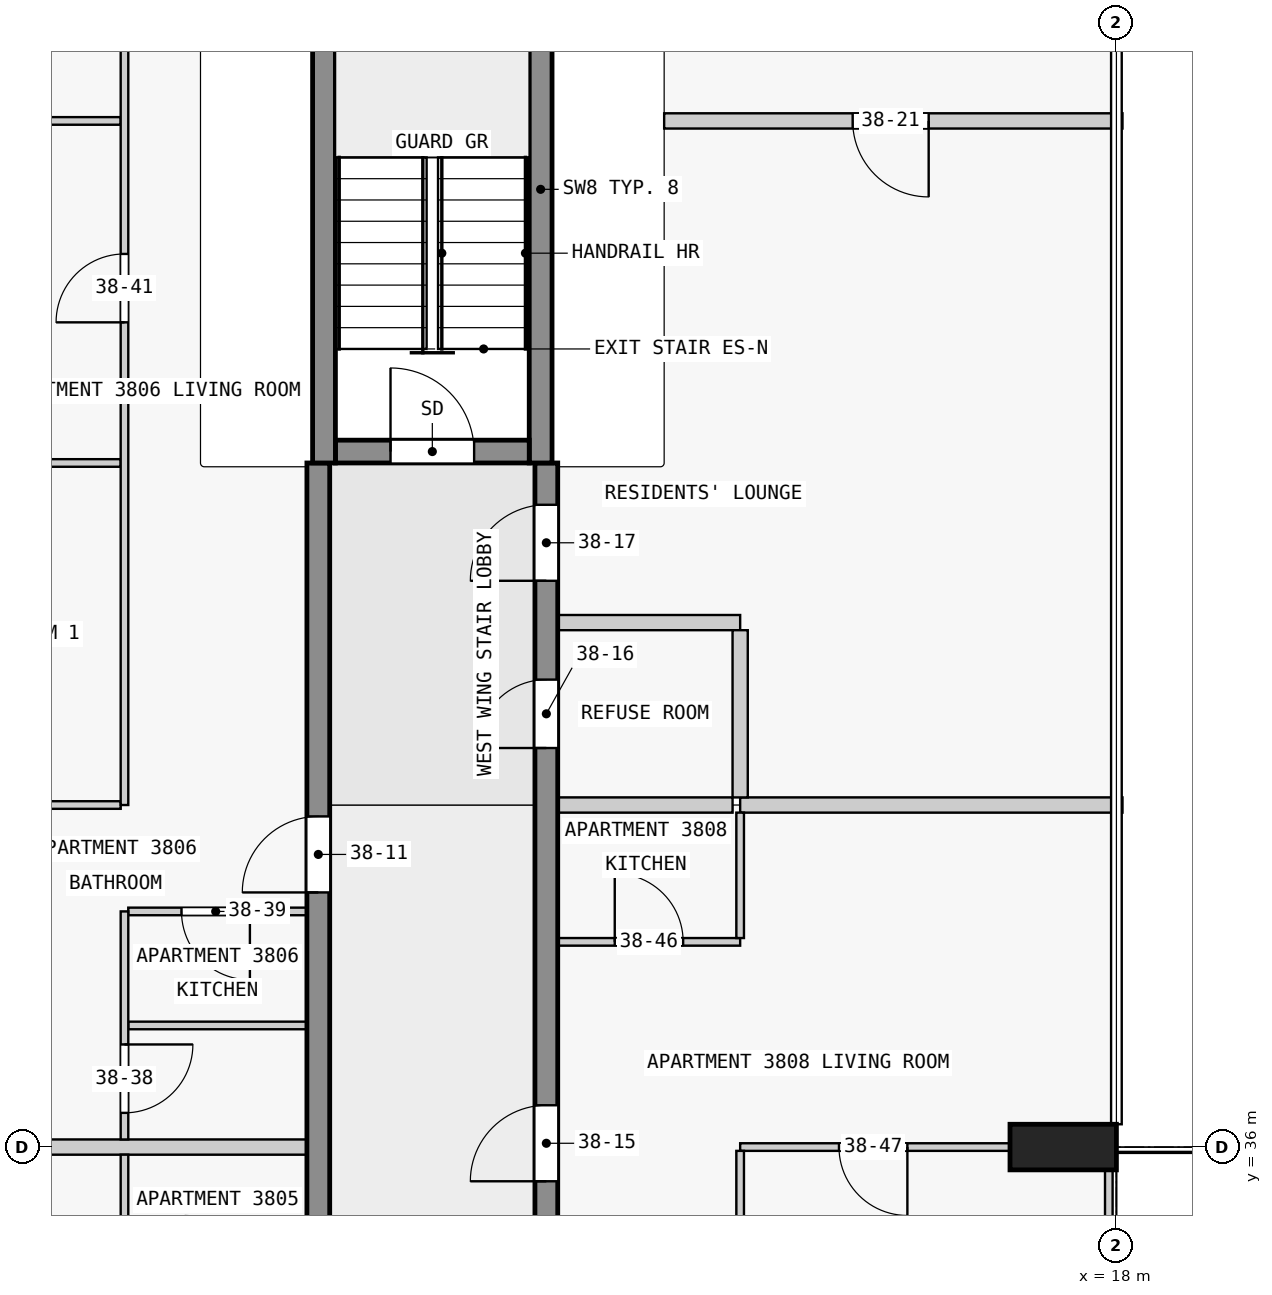
"""IFC4 building model, lengths in metres.
Left out: names, types, materials, properties, quantities, classifications, styles, units other than length and angle.
Written with IfcOpenShell. Run it as: python <this file> out.ifc"""

import sys

from ifc_helpers import new_model, si_unit, direction, frame, frame_2d, origin, origin_2d, place, context, subcontext, project, spatial, rectangle, extrude, element, fill, save


model = new_model("IFC4")
c1 = context("Model", 3, precision=1e-05, world=origin(), true_north=direction((0.0, 1.0)))
c2 = subcontext(c1, "Body", "Model", "MODEL_VIEW")
j1 = project(units=[si_unit("LENGTHUNIT", "METRE"), si_unit("PLANEANGLEUNIT", "RADIAN")], contexts=[c1])
p1 = place(None, origin())
s1 = spatial("IfcSite", under=j1, at=p1, CompositionType="ELEMENT")
p2 = place(p1, origin())
s2 = spatial("IfcBuilding", under=s1, at=p2, CompositionType="ELEMENT")
p3 = place(p2, frame((0.0, 0.0, 149.9)))
s3 = spatial("IfcBuildingStorey", under=s2, at=p3, CompositionType="ELEMENT", Elevation=149.9)
p4 = place(p3, frame((17.3, 36.0, 0.0), z_axis=(0.0, 0.0, 1.0), x_axis=(0.0, 1.0, 0.0)))
e1 = element("IfcColumn", 1, at=p4, inside=s3, PredefinedType="COLUMN", context=c2, shape_type="SweptSolid", body=[
    extrude(rectangle(XDim=0.6, YDim=1.4, at=origin_2d()), origin(), (0.0, 0.0, 1.0), 3.5),
])
p5 = place(p3, frame((7.725, 45.15, 0.0), z_axis=(0.0, 0.0, 1.0), x_axis=(1.0, 0.0, 0.0)))
e2 = element("IfcWall", 2, at=p5, inside=s3, PredefinedType="SHEAR", context=c2, shape_type="SweptSolid", body=[
    extrude(rectangle(XDim=2.55, YDim=0.3, at=frame_2d((1.275, 0.0))), origin(), (0.0, 0.0, 1.0), 3.5),
])
p6 = place(p5, frame((0.725, 0.0, 0.0)))
e3 = element("IfcOpeningElement", 3, at=p6, cuts=e2, PredefinedType="OPENING", context=c2, shape_type="SweptSolid", body=[
    extrude(rectangle(XDim=1.1, YDim=2.1, at=frame_2d((0.55, 1.05))), frame((0.0, 0.16, 0.0), z_axis=(0.0, -1.0, 0.0), x_axis=(1.0, 0.0, 0.0)), (0.0, 0.0, 1.0), 0.32),
])
for number, where, z_axis, x_axis in (
    (4, (7.575, 45.0, 0.0), (0.0, 0.0, 1.0), (0.0, 1.0, 0.0)),
    (5, (10.425, 45.0, 0.0), (0.0, 0.0, 1.0), (0.0, 1.0, 0.0)),
):
    element("IfcWall", number, at=place(p3, frame(where, z_axis=z_axis, x_axis=x_axis)), inside=s3, PredefinedType="SHEAR", context=c2, shape_type="SweptSolid", body=[
        extrude(rectangle(XDim=7.2, YDim=0.3, at=frame_2d((3.6, 0.0))), origin(), (0.0, 0.0, 1.0), 3.5),
    ])
p7 = place(p3, frame((7.5, 18.0, 0.0), z_axis=(0.0, 0.0, 1.0), x_axis=(0.0, 1.0, 0.0)))
e6 = element("IfcWall", 6, at=p7, inside=s3, PredefinedType="SHEAR", context=c2, shape_type="SweptSolid", body=[
    extrude(rectangle(XDim=27.0, YDim=0.3, at=frame_2d((13.5, 0.0))), origin(), (0.0, 0.0, 1.0), 3.25),
])
p8 = place(p7, frame((1.75, 0.0, 0.0)))
e7 = element("IfcOpeningElement", 7, at=p8, cuts=e6, PredefinedType="OPENING", context=c2, shape_type="SweptSolid", body=[
    extrude(rectangle(XDim=1.0, YDim=2.1, at=frame_2d((0.5, 1.05))), frame((0.0, 0.16, 0.0), z_axis=(0.0, -1.0, 0.0), x_axis=(1.0, 0.0, 0.0)), (0.0, 0.0, 1.0), 0.32),
])
p9 = place(p7, frame((5.85, 0.0, 0.0)))
e8 = element("IfcOpeningElement", 8, at=p9, cuts=e6, PredefinedType="OPENING", context=c2, shape_type="SweptSolid", body=[
    extrude(rectangle(XDim=1.8, YDim=2.1, at=frame_2d((0.9, 1.05))), frame((0.0, 0.16, 0.0), z_axis=(0.0, -1.0, 0.0), x_axis=(1.0, 0.0, 0.0)), (0.0, 0.0, 1.0), 0.32),
])
p10 = place(p7, frame((13.05, 0.0, 0.0)))
e9 = element("IfcOpeningElement", 9, at=p10, cuts=e6, PredefinedType="OPENING", context=c2, shape_type="SweptSolid", body=[
    extrude(rectangle(XDim=1.0, YDim=2.1, at=frame_2d((0.5, 1.05))), frame((0.0, 0.16, 0.0), z_axis=(0.0, -1.0, 0.0), x_axis=(1.0, 0.0, 0.0)), (0.0, 0.0, 1.0), 0.32),
])
p11 = place(p7, frame((21.35, 0.0, 0.0)))
e10 = element("IfcOpeningElement", 10, at=p11, cuts=e6, PredefinedType="OPENING", context=c2, shape_type="SweptSolid", body=[
    extrude(rectangle(XDim=1.0, YDim=2.1, at=frame_2d((0.5, 1.05))), frame((0.0, 0.16, 0.0), z_axis=(0.0, -1.0, 0.0), x_axis=(1.0, 0.0, 0.0)), (0.0, 0.0, 1.0), 0.32),
])
p12 = place(p3, frame((10.5, 18.0, 0.0), z_axis=(0.0, 0.0, 1.0), x_axis=(0.0, 1.0, 0.0)))
e11 = element("IfcWall", 11, at=p12, inside=s3, PredefinedType="SHEAR", context=c2, shape_type="SweptSolid", body=[
    extrude(rectangle(XDim=27.0, YDim=0.3, at=frame_2d((13.5, 0.0))), origin(), (0.0, 0.0, 1.0), 3.25),
])
p13 = place(p12, frame((1.85, 0.0, 0.0)))
e12 = element("IfcOpeningElement", 12, at=p13, cuts=e11, PredefinedType="OPENING", context=c2, shape_type="SweptSolid", body=[
    extrude(rectangle(XDim=0.9, YDim=2.1, at=frame_2d((0.45, 1.05))), frame((0.0, 0.16, 0.0), z_axis=(0.0, -1.0, 0.0), x_axis=(1.0, 0.0, 0.0)), (0.0, 0.0, 1.0), 0.32),
])
p14 = place(p12, frame((6.25, 0.0, 0.0)))
e13 = element("IfcOpeningElement", 13, at=p14, cuts=e11, PredefinedType="OPENING", context=c2, shape_type="SweptSolid", body=[
    extrude(rectangle(XDim=1.0, YDim=2.1, at=frame_2d((0.5, 1.05))), frame((0.0, 0.16, 0.0), z_axis=(0.0, -1.0, 0.0), x_axis=(1.0, 0.0, 0.0)), (0.0, 0.0, 1.0), 0.32),
])
p15 = place(p12, frame((10.85, 0.0, 0.0)))
e14 = element("IfcOpeningElement", 14, at=p15, cuts=e11, PredefinedType="OPENING", context=c2, shape_type="SweptSolid", body=[
    extrude(rectangle(XDim=0.9, YDim=2.1, at=frame_2d((0.45, 1.05))), frame((0.0, 0.16, 0.0), z_axis=(0.0, -1.0, 0.0), x_axis=(1.0, 0.0, 0.0)), (0.0, 0.0, 1.0), 0.32),
])
p16 = place(p12, frame((17.55, 0.0, 0.0)))
e15 = element("IfcOpeningElement", 15, at=p16, cuts=e11, PredefinedType="OPENING", context=c2, shape_type="SweptSolid", body=[
    extrude(rectangle(XDim=1.0, YDim=2.1, at=frame_2d((0.5, 1.05))), frame((0.0, 0.16, 0.0), z_axis=(0.0, -1.0, 0.0), x_axis=(1.0, 0.0, 0.0)), (0.0, 0.0, 1.0), 0.32),
])
p17 = place(p12, frame((23.25, 0.0, 0.0)))
e16 = element("IfcOpeningElement", 16, at=p17, cuts=e11, PredefinedType="OPENING", context=c2, shape_type="SweptSolid", body=[
    extrude(rectangle(XDim=0.9, YDim=2.1, at=frame_2d((0.45, 1.05))), frame((0.0, 0.16, 0.0), z_axis=(0.0, -1.0, 0.0), x_axis=(1.0, 0.0, 0.0)), (0.0, 0.0, 1.0), 0.32),
])
p18 = place(p12, frame((25.45, 0.0, 0.0)))
e17 = element("IfcOpeningElement", 17, at=p18, cuts=e11, PredefinedType="OPENING", context=c2, shape_type="SweptSolid", body=[
    extrude(rectangle(XDim=1.0, YDim=2.1, at=frame_2d((0.5, 1.05))), frame((0.0, 0.16, 0.0), z_axis=(0.0, -1.0, 0.0), x_axis=(1.0, 0.0, 0.0)), (0.0, 0.0, 1.0), 0.32),
])
p19 = place(p3, frame((17.9, 36.0, 0.0), z_axis=(0.0, 0.0, 1.0), x_axis=(0.0, -1.0, 0.0)))
e18 = element("IfcWall", 18, at=p19, inside=s3, PredefinedType="STANDARD", context=c2, shape_type="SweptSolid", body=[
    extrude(rectangle(XDim=4.5, YDim=0.1, at=frame_2d((2.25, 0.0))), origin(), (0.0, 0.0, 1.0), 3.25),
])
p20 = place(p19, frame((1.05, 0.0, 0.0)))
e19 = element("IfcOpeningElement", 19, at=p20, cuts=e18, PredefinedType="OPENING", context=c2, shape_type="SweptSolid", body=[
    extrude(rectangle(XDim=2.4, YDim=2.4, at=frame_2d((1.2, 1.2))), frame((0.0, 0.06, 0.0), z_axis=(0.0, -1.0, 0.0), x_axis=(1.0, 0.0, 0.0)), (0.0, 0.0, 1.0), 0.12),
])
p21 = place(p3, frame((16.6, 36.0, 0.0), z_axis=(0.0, 0.0, 1.0), x_axis=(-1.0, 0.0, 0.0)))
e20 = element("IfcWall", 20, at=p21, inside=s3, PredefinedType="PARTITIONING", context=c2, shape_type="SweptSolid", body=[
    extrude(rectangle(XDim=3.55, YDim=0.1, at=frame_2d((1.775, 0.0))), origin(), (0.0, 0.0, 1.0), 3.25),
])
p22 = place(p21, frame((1.35, 0.0, 0.0)))
e21 = element("IfcOpeningElement", 21, at=p22, cuts=e20, PredefinedType="OPENING", context=c2, shape_type="SweptSolid", body=[
    extrude(rectangle(XDim=0.9, YDim=2.1, at=frame_2d((0.45, 1.05))), frame((0.0, 0.06, 0.0), z_axis=(0.0, -1.0, 0.0), x_axis=(1.0, 0.0, 0.0)), (0.0, 0.0, 1.0), 0.12),
])
p23 = place(p3, frame((7.35, 36.0, 0.0), z_axis=(0.0, 0.0, 1.0), x_axis=(-1.0, 0.0, 0.0)))
e22 = element("IfcWall", 22, at=p23, inside=s3, PredefinedType="PARTITIONING", context=c2, shape_type="SweptSolid", body=[
    extrude(rectangle(XDim=5.95, YDim=0.2, at=frame_2d((2.975, 0.0))), origin(), (0.0, 0.0, 1.0), 3.25),
])
p24 = place(p3, frame((7.35, 37.6, 0.0), z_axis=(0.0, 0.0, 1.0), x_axis=(-1.0, 0.0, 0.0)))
e23 = element("IfcWall", 23, at=p24, inside=s3, PredefinedType="PARTITIONING", context=c2, shape_type="SweptSolid", body=[
    extrude(rectangle(XDim=2.35, YDim=0.1, at=frame_2d((1.175, 0.0))), origin(), (0.0, 0.0, 1.0), 3.25),
])
p25 = place(p3, frame((10.65, 38.7, 0.0), z_axis=(0.0, 0.0, 1.0), x_axis=(1.0, 0.0, 0.0)))
e24 = element("IfcWall", 24, at=p25, inside=s3, PredefinedType="PARTITIONING", context=c2, shape_type="SweptSolid", body=[
    extrude(rectangle(XDim=2.4, YDim=0.1, at=frame_2d((1.2, 0.0))), origin(), (0.0, 0.0, 1.0), 3.25),
])
p26 = place(p25, frame((0.75, 0.0, 0.0)))
e25 = element("IfcOpeningElement", 25, at=p26, cuts=e24, PredefinedType="OPENING", context=c2, shape_type="SweptSolid", body=[
    extrude(rectangle(XDim=0.9, YDim=2.1, at=frame_2d((0.45, 1.05))), frame((0.0, 0.06, 0.0), z_axis=(0.0, -1.0, 0.0), x_axis=(1.0, 0.0, 0.0)), (0.0, 0.0, 1.0), 0.12),
])
p27 = place(p3, frame((7.35, 39.1, 0.0), z_axis=(0.0, 0.0, 1.0), x_axis=(-1.0, 0.0, 0.0)))
e26 = element("IfcWall", 26, at=p27, inside=s3, PredefinedType="PARTITIONING", context=c2, shape_type="SweptSolid", body=[
    extrude(rectangle(XDim=2.35, YDim=0.1, at=frame_2d((1.175, 0.0))), origin(), (0.0, 0.0, 1.0), 3.25),
])
p28 = place(p27, frame((0.75, 0.0, 0.0)))
e27 = element("IfcOpeningElement", 27, at=p28, cuts=e26, PredefinedType="OPENING", context=c2, shape_type="SweptSolid", body=[
    extrude(rectangle(XDim=0.9, YDim=2.1, at=frame_2d((0.45, 1.05))), frame((0.0, 0.06, 0.0), z_axis=(0.0, -1.0, 0.0), x_axis=(1.0, 0.0, 0.0)), (0.0, 0.0, 1.0), 0.12),
])
p29 = place(p3, frame((0.15, 40.5, 0.0), z_axis=(0.0, 0.0, 1.0), x_axis=(1.0, 0.0, 0.0)))
e28 = element("IfcWall", 28, at=p29, inside=s3, PredefinedType="PARTITIONING", context=c2, shape_type="SweptSolid", body=[
    extrude(rectangle(XDim=4.75, YDim=0.1, at=frame_2d((2.375, 0.0))), origin(), (0.0, 0.0, 1.0), 3.25),
])
p30 = place(p29, frame((1.95, 0.0, 0.0)))
e29 = element("IfcOpeningElement", 29, at=p30, cuts=e28, PredefinedType="OPENING", context=c2, shape_type="SweptSolid", body=[
    extrude(rectangle(XDim=0.9, YDim=2.1, at=frame_2d((0.45, 1.05))), frame((0.0, 0.06, 0.0), z_axis=(0.0, -1.0, 0.0), x_axis=(1.0, 0.0, 0.0)), (0.0, 0.0, 1.0), 0.12),
])
p31 = place(p3, frame((12.95, 40.5, 0.0), z_axis=(0.0, 0.0, 1.0), x_axis=(-1.0, 0.0, 0.0)))
e30 = element("IfcWall", 30, at=p31, inside=s3, PredefinedType="PARTITIONING", context=c2, shape_type="SweptSolid", body=[
    extrude(rectangle(XDim=2.3, YDim=0.2, at=frame_2d((1.15, 0.0))), origin(), (0.0, 0.0, 1.0), 3.25),
])
p32 = place(p3, frame((13.05, 40.5, 0.0), z_axis=(0.0, 0.0, 1.0), x_axis=(1.0, 0.0, 0.0)))
e31 = element("IfcWall", 31, at=p32, inside=s3, PredefinedType="PARTITIONING", context=c2, shape_type="SweptSolid", body=[
    extrude(rectangle(XDim=5.03, YDim=0.2, at=frame_2d((2.515, 0.0))), origin(), (0.0, 0.0, 1.0), 3.25),
])
p33 = place(p3, frame((13.05, 42.9, 0.0), z_axis=(0.0, 0.0, 1.0), x_axis=(-1.0, 0.0, 0.0)))
e32 = element("IfcWall", 32, at=p33, inside=s3, PredefinedType="PARTITIONING", context=c2, shape_type="SweptSolid", body=[
    extrude(rectangle(XDim=2.4, YDim=0.2, at=frame_2d((1.2, 0.0))), origin(), (0.0, 0.0, 1.0), 3.25),
])
p34 = place(p3, frame((4.9, 45.0, 0.0), z_axis=(0.0, 0.0, 1.0), x_axis=(-1.0, 0.0, 0.0)))
e33 = element("IfcWall", 33, at=p34, inside=s3, PredefinedType="PARTITIONING", context=c2, shape_type="SweptSolid", body=[
    extrude(rectangle(XDim=4.75, YDim=0.1, at=frame_2d((2.375, 0.0))), origin(), (0.0, 0.0, 1.0), 3.25),
])
p35 = place(p3, frame((4.9, 49.5, 0.0), z_axis=(0.0, 0.0, 1.0), x_axis=(-1.0, 0.0, 0.0)))
e34 = element("IfcWall", 34, at=p35, inside=s3, PredefinedType="PARTITIONING", context=c2, shape_type="SweptSolid", body=[
    extrude(rectangle(XDim=4.98, YDim=0.1, at=frame_2d((2.49, 0.0))), origin(), (0.0, 0.0, 1.0), 3.25),
])
p36 = place(p3, frame((18.08, 49.5, 0.0), z_axis=(0.0, 0.0, 1.0), x_axis=(-1.0, 0.0, 0.0)))
e35 = element("IfcWall", 35, at=p36, inside=s3, PredefinedType="PARTITIONING", context=c2, shape_type="SweptSolid", body=[
    extrude(rectangle(XDim=6.03, YDim=0.2, at=frame_2d((3.015, 0.0))), origin(), (0.0, 0.0, 1.0), 3.25),
])
p37 = place(p36, frame((2.55, 0.0, 0.0)))
e36 = element("IfcOpeningElement", 36, at=p37, cuts=e35, PredefinedType="OPENING", context=c2, shape_type="SweptSolid", body=[
    extrude(rectangle(XDim=1.0, YDim=2.1, at=frame_2d((0.5, 1.05))), frame((0.0, 0.11, 0.0), z_axis=(0.0, -1.0, 0.0), x_axis=(1.0, 0.0, 0.0)), (0.0, 0.0, 1.0), 0.22),
])
p38 = place(p3, frame((4.95, 35.9, 0.0), z_axis=(0.0, 0.0, 1.0), x_axis=(0.0, -1.0, 0.0)))
e37 = element("IfcWall", 37, at=p38, inside=s3, PredefinedType="PARTITIONING", context=c2, shape_type="SweptSolid", body=[
    extrude(rectangle(XDim=1.7, YDim=0.1, at=frame_2d((0.85, 0.0))), origin(), (0.0, 0.0, 1.0), 3.25),
])
p39 = place(p3, frame((4.95, 39.1, 0.0), z_axis=(0.0, 0.0, 1.0), x_axis=(0.0, -1.0, 0.0)))
e38 = element("IfcWall", 38, at=p39, inside=s3, PredefinedType="PARTITIONING", context=c2, shape_type="SweptSolid", body=[
    extrude(rectangle(XDim=3.0, YDim=0.1, at=frame_2d((1.5, 0.0))), origin(), (0.0, 0.0, 1.0), 3.25),
])
p40 = place(p39, frame((1.75, 0.0, 0.0)))
e39 = element("IfcOpeningElement", 39, at=p40, cuts=e38, PredefinedType="OPENING", context=c2, shape_type="SweptSolid", body=[
    extrude(rectangle(XDim=0.9, YDim=2.1, at=frame_2d((0.45, 1.05))), frame((0.0, 0.06, 0.0), z_axis=(0.0, -1.0, 0.0), x_axis=(1.0, 0.0, 0.0)), (0.0, 0.0, 1.0), 0.12),
])
p41 = place(p3, frame((4.95, 40.5, 0.0), z_axis=(0.0, 0.0, 1.0), x_axis=(0.0, 1.0, 0.0)))
e40 = element("IfcWall", 40, at=p41, inside=s3, PredefinedType="PARTITIONING", context=c2, shape_type="SweptSolid", body=[
    extrude(rectangle(XDim=13.58, YDim=0.1, at=frame_2d((6.79, 0.0))), origin(), (0.0, 0.0, 1.0), 3.25),
])
p42 = place(p41, frame((6.35, 0.0, 0.0)))
e41 = element("IfcOpeningElement", 41, at=p42, cuts=e40, PredefinedType="OPENING", context=c2, shape_type="SweptSolid", body=[
    extrude(rectangle(XDim=0.9, YDim=2.1, at=frame_2d((0.45, 1.05))), frame((0.0, 0.06, 0.0), z_axis=(0.0, -1.0, 0.0), x_axis=(1.0, 0.0, 0.0)), (0.0, 0.0, 1.0), 0.12),
])
p43 = place(p41, frame((10.75, 0.0, 0.0)))
e42 = element("IfcOpeningElement", 42, at=p43, cuts=e40, PredefinedType="OPENING", context=c2, shape_type="SweptSolid", body=[
    extrude(rectangle(XDim=0.9, YDim=2.1, at=frame_2d((0.45, 1.05))), frame((0.0, 0.06, 0.0), z_axis=(0.0, -1.0, 0.0), x_axis=(1.0, 0.0, 0.0)), (0.0, 0.0, 1.0), 0.12),
])
p44 = place(p3, frame((13.05, 35.95, 0.0), z_axis=(0.0, 0.0, 1.0), x_axis=(0.0, -1.0, 0.0)))
e43 = element("IfcWall", 43, at=p44, inside=s3, PredefinedType="PARTITIONING", context=c2, shape_type="SweptSolid", body=[
    extrude(rectangle(XDim=2.65, YDim=0.1, at=frame_2d((1.325, 0.0))), origin(), (0.0, 0.0, 1.0), 3.25),
])
p45 = place(p3, frame((13.05, 38.75, 0.0), z_axis=(0.0, 0.0, 1.0), x_axis=(0.0, 1.0, 0.0)))
e44 = element("IfcWall", 44, at=p45, inside=s3, PredefinedType="PARTITIONING", context=c2, shape_type="SweptSolid", body=[
    extrude(rectangle(XDim=1.65, YDim=0.1, at=frame_2d((0.825, 0.0))), origin(), (0.0, 0.0, 1.0), 3.25),
])
p46 = place(p3, frame((13.05, 40.6, 0.0), z_axis=(0.0, 0.0, 1.0), x_axis=(0.0, 1.0, 0.0)))
e45 = element("IfcWall", 45, at=p46, inside=s3, PredefinedType="PARTITIONING", context=c2, shape_type="SweptSolid", body=[
    extrude(rectangle(XDim=2.2, YDim=0.2, at=frame_2d((1.1, 0.0))), origin(), (0.0, 0.0, 1.0), 3.25),
])
p47 = place(p6, origin())
e46 = element("IfcDoor", 46, at=p47, inside=s3, OperationType="SINGLE_SWING_LEFT", PredefinedType="DOOR", context=c2, shape_type="SweptSolid", body=[
    extrude(rectangle(XDim=1.1, YDim=2.1, at=frame_2d((0.55, 1.05))), frame((0.0, 0.025, 0.0), z_axis=(0.0, -1.0, 0.0), x_axis=(1.0, 0.0, 0.0)), (0.0, 0.0, 1.0), 0.05),
])
fill(e3, e46)
p48 = place(p11, origin())
e47 = element("IfcDoor", 47, at=p48, inside=s3, OperationType="SINGLE_SWING_RIGHT", PredefinedType="DOOR", context=c2, shape_type="SweptSolid", body=[
    extrude(rectangle(XDim=1.0, YDim=2.1, at=frame_2d((0.5, 1.05))), frame((0.0, 0.025, 0.0), z_axis=(0.0, -1.0, 0.0), x_axis=(1.0, 0.0, 0.0)), (0.0, 0.0, 1.0), 0.05),
])
fill(e10, e47)
p49 = place(p16, origin())
e48 = element("IfcDoor", 48, at=p49, inside=s3, OperationType="SINGLE_SWING_RIGHT", PredefinedType="DOOR", context=c2, shape_type="SweptSolid", body=[
    extrude(rectangle(XDim=1.0, YDim=2.1, at=frame_2d((0.5, 1.05))), frame((0.0, 0.025, 0.0), z_axis=(0.0, -1.0, 0.0), x_axis=(1.0, 0.0, 0.0)), (0.0, 0.0, 1.0), 0.05),
])
fill(e15, e48)
p50 = place(p17, origin())
e49 = element("IfcDoor", 49, at=p50, inside=s3, OperationType="SINGLE_SWING_RIGHT", PredefinedType="DOOR", context=c2, shape_type="SweptSolid", body=[
    extrude(rectangle(XDim=0.9, YDim=2.1, at=frame_2d((0.45, 1.05))), frame((0.0, 0.025, 0.0), z_axis=(0.0, -1.0, 0.0), x_axis=(1.0, 0.0, 0.0)), (0.0, 0.0, 1.0), 0.05),
])
fill(e16, e49)
p51 = place(p18, origin())
e50 = element("IfcDoor", 50, at=p51, inside=s3, OperationType="SINGLE_SWING_RIGHT", PredefinedType="DOOR", context=c2, shape_type="SweptSolid", body=[
    extrude(rectangle(XDim=1.0, YDim=2.1, at=frame_2d((0.5, 1.05))), frame((0.0, 0.025, 0.0), z_axis=(0.0, -1.0, 0.0), x_axis=(1.0, 0.0, 0.0)), (0.0, 0.0, 1.0), 0.05),
])
fill(e17, e50)
p52 = place(p37, origin())
e51 = element("IfcDoor", 51, at=p52, inside=s3, OperationType="SINGLE_SWING_RIGHT", PredefinedType="DOOR", context=c2, shape_type="SweptSolid", body=[
    extrude(rectangle(XDim=1.0, YDim=2.1, at=frame_2d((0.5, 1.05))), frame((0.0, 0.025, 0.0), z_axis=(0.0, -1.0, 0.0), x_axis=(1.0, 0.0, 0.0)), (0.0, 0.0, 1.0), 0.05),
])
fill(e36, e51)
p53 = place(p40, origin())
e52 = element("IfcDoor", 52, at=p53, inside=s3, OperationType="SINGLE_SWING_RIGHT", PredefinedType="DOOR", context=c2, shape_type="SweptSolid", body=[
    extrude(rectangle(XDim=0.9, YDim=2.1, at=frame_2d((0.45, 1.05))), frame((0.0, 0.025, 0.0), z_axis=(0.0, -1.0, 0.0), x_axis=(1.0, 0.0, 0.0)), (0.0, 0.0, 1.0), 0.05),
])
fill(e39, e52)
p54 = place(p28, origin())
e53 = element("IfcDoor", 53, at=p54, inside=s3, OperationType="SINGLE_SWING_RIGHT", PredefinedType="DOOR", context=c2, shape_type="SweptSolid", body=[
    extrude(rectangle(XDim=0.9, YDim=2.1, at=frame_2d((0.45, 1.05))), frame((0.0, 0.025, 0.0), z_axis=(0.0, -1.0, 0.0), x_axis=(1.0, 0.0, 0.0)), (0.0, 0.0, 1.0), 0.05),
])
fill(e27, e53)
p55 = place(p42, origin())
e54 = element("IfcDoor", 54, at=p55, inside=s3, OperationType="SINGLE_SWING_RIGHT", PredefinedType="DOOR", context=c2, shape_type="SweptSolid", body=[
    extrude(rectangle(XDim=0.9, YDim=2.1, at=frame_2d((0.45, 1.05))), frame((0.0, 0.025, 0.0), z_axis=(0.0, -1.0, 0.0), x_axis=(1.0, 0.0, 0.0)), (0.0, 0.0, 1.0), 0.05),
])
fill(e41, e54)
p56 = place(p26, origin())
e55 = element("IfcDoor", 55, at=p56, inside=s3, OperationType="SINGLE_SWING_LEFT", PredefinedType="DOOR", context=c2, shape_type="SweptSolid", body=[
    extrude(rectangle(XDim=0.9, YDim=2.1, at=frame_2d((0.45, 1.05))), frame((0.0, 0.025, 0.0), z_axis=(0.0, -1.0, 0.0), x_axis=(1.0, 0.0, 0.0)), (0.0, 0.0, 1.0), 0.05),
])
fill(e25, e55)
p57 = place(p22, origin())
e56 = element("IfcDoor", 56, at=p57, inside=s3, OperationType="SINGLE_SWING_RIGHT", PredefinedType="DOOR", context=c2, shape_type="SweptSolid", body=[
    extrude(rectangle(XDim=0.9, YDim=2.1, at=frame_2d((0.45, 1.05))), frame((0.0, 0.025, 0.0), z_axis=(0.0, -1.0, 0.0), x_axis=(1.0, 0.0, 0.0)), (0.0, 0.0, 1.0), 0.05),
])
fill(e21, e56)
save(model, sys.argv[1])
